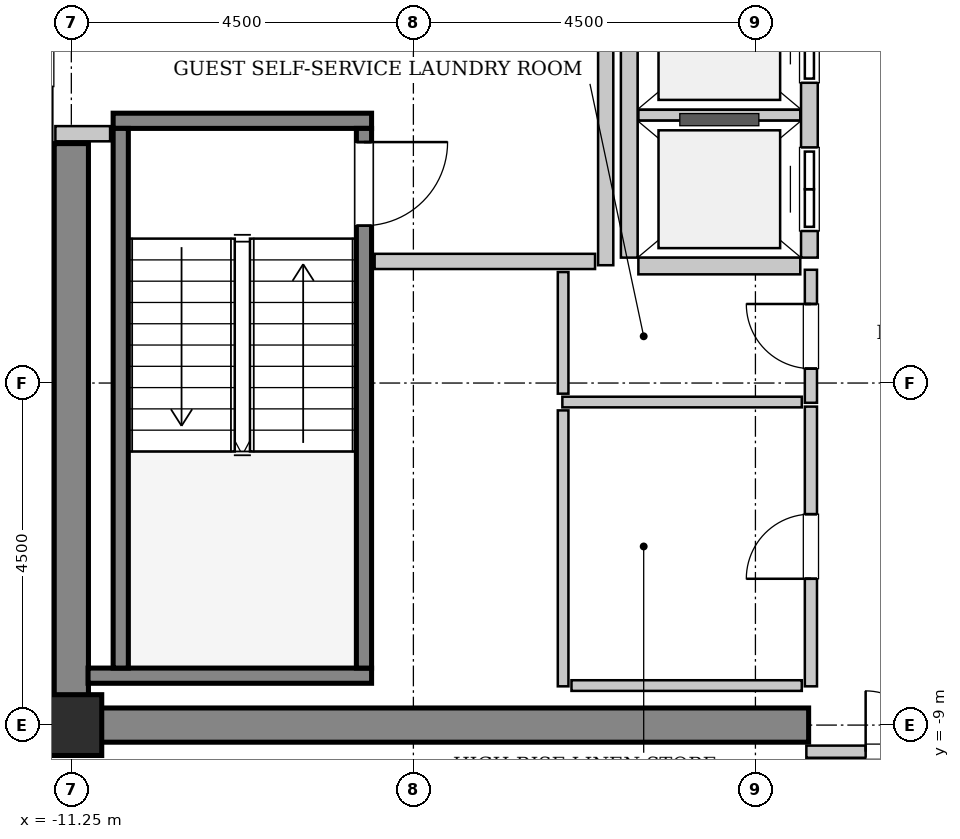
"""IFC4 building model, lengths in metres.
Left out: names, types, materials, properties, quantities, classifications, styles, units other than length and angle.
Written with IfcOpenShell. Run it as: python <this file> out.ifc"""

import sys

from ifc_helpers import new_model, si_unit, direction, frame, frame_2d, origin, origin_2d, place, context, subcontext, project, spatial, rectangle, hollow_rectangle, extrude, source, transform, mapped, element, fill, save


model = new_model("IFC4")
c1 = context("Model", 3, precision=1e-05, world=origin(), true_north=direction((0.0, 1.0)))
c2 = subcontext(c1, "Body", "Model", "MODEL_VIEW")
j1 = project(units=[si_unit("LENGTHUNIT", "METRE"), si_unit("PLANEANGLEUNIT", "RADIAN")], contexts=[c1])
p1 = place(None, origin())
s1 = spatial("IfcSite", under=j1, at=p1, CompositionType="ELEMENT")
p2 = place(p1, origin())
s2 = spatial("IfcBuilding", under=s1, at=p2, CompositionType="ELEMENT")
p3 = place(p2, frame((0.0, 0.0, 268.4)))
s3 = spatial("IfcBuildingStorey", under=s2, at=p3, CompositionType="ELEMENT", Elevation=268.4)
m1 = source(origin(), c2, "Body", "SweptSolid", [
    extrude(rectangle(XDim=9.925, YDim=0.45, at=frame_2d((4.962, 0.0))), origin(), (0.0, 0.0, 1.0), 3.8),
])
p4 = place(p3, frame((-11.475, -9.0, 0.0), z_axis=(0.0, 0.0, 1.0), x_axis=(1.0, 0.0, 0.0)))
e1 = element("IfcWall", 1, at=p4, inside=s3, PredefinedType="SHEAR", context=c2, shape_type="MappedRepresentation", body=[
    mapped(m1, transform((0.0, 0.0, 0.0), x_axis=(1.0, 0.0, 0.0), y_axis=(0.0, 1.0, 0.0), z_axis=(0.0, 0.0, 1.0), scale=1.0)),
])
m2 = source(origin(), c2, "Body", "SweptSolid", [
    extrude(rectangle(XDim=7.425, YDim=0.45, at=frame_2d((3.712, 0.0))), origin(), (0.0, 0.0, 1.0), 3.8),
])
p5 = place(p3, frame((-11.25, -8.775, 0.0), z_axis=(0.0, 0.0, 1.0), x_axis=(0.0, 1.0, 0.0)))
e2 = element("IfcWall", 2, at=p5, inside=s3, PredefinedType="SHEAR", context=c2, shape_type="MappedRepresentation", body=[
    mapped(m2, transform((0.0, 0.0, 0.0), x_axis=(1.0, 0.0, 0.0), y_axis=(0.0, 1.0, 0.0), z_axis=(0.0, 0.0, 1.0), scale=1.0)),
])
m3 = source(origin(), c2, "Body", "SweptSolid", [
    extrude(hollow_rectangle(XDim=0.8, YDim=0.8, WallThickness=0.04, InnerFilletRadius=0.04, OuterFilletRadius=0.08, at=origin_2d()), origin(), (0.0, 0.0, 1.0), 3.8),
])
p6 = place(p3, frame((-11.25, -9.0, 0.0), z_axis=(0.0, 0.0, 1.0), x_axis=(1.0, 0.0, 0.0)))
e3 = element("IfcColumn", 3, at=p6, inside=s3, PredefinedType="COLUMN", context=c2, shape_type="MappedRepresentation", body=[
    mapped(m3, transform((0.0, 0.0, 0.0), x_axis=(1.0, 0.0, 0.0), y_axis=(0.0, 1.0, 0.0), z_axis=(0.0, 0.0, 1.0), scale=1.0)),
])
m4 = source(origin(), c2, "Body", "SweptSolid", [
    extrude(rectangle(XDim=3.4, YDim=0.2, at=frame_2d((1.7, 0.0))), origin(), (0.0, 0.0, 1.0), 3.8),
])
p7 = place(p3, frame((-10.7, -1.05, 0.0), z_axis=(0.0, 0.0, 1.0), x_axis=(1.0, 0.0, 0.0)))
e4 = element("IfcWall", 4, at=p7, inside=s3, PredefinedType="SOLIDWALL", context=c2, shape_type="MappedRepresentation", body=[
    mapped(m4, transform((0.0, 0.0, 0.0), x_axis=(1.0, 0.0, 0.0), y_axis=(0.0, 1.0, 0.0), z_axis=(0.0, 0.0, 1.0), scale=1.0)),
])
m5 = source(origin(), c2, "Body", "SweptSolid", [
    extrude(rectangle(XDim=3.73, YDim=0.2, at=frame_2d((1.865, 0.0))), origin(), (0.0, 0.0, 1.0), 3.8),
])
p8 = place(p3, frame((-11.03, -8.35, 0.0), z_axis=(0.0, 0.0, 1.0), x_axis=(1.0, 0.0, 0.0)))
e5 = element("IfcWall", 5, at=p8, inside=s3, PredefinedType="SOLIDWALL", context=c2, shape_type="MappedRepresentation", body=[
    mapped(m5, transform((0.0, 0.0, 0.0), x_axis=(1.0, 0.0, 0.0), y_axis=(0.0, 1.0, 0.0), z_axis=(0.0, 0.0, 1.0), scale=1.0)),
])
m6 = source(origin(), c2, "Body", "SweptSolid", [
    extrude(rectangle(XDim=7.1, YDim=0.2, at=frame_2d((3.55, 0.0))), origin(), (0.0, 0.0, 1.0), 3.8),
])
p9 = place(p3, frame((-10.6, -1.15, 0.0), z_axis=(0.0, 0.0, 1.0), x_axis=(0.0, -1.0, 0.0)))
e6 = element("IfcWall", 6, at=p9, inside=s3, PredefinedType="SOLIDWALL", context=c2, shape_type="MappedRepresentation", body=[
    mapped(m6, transform((0.0, 0.0, 0.0), x_axis=(1.0, 0.0, 0.0), y_axis=(0.0, 1.0, 0.0), z_axis=(0.0, 0.0, 1.0), scale=1.0)),
])
p10 = place(p3, frame((-7.4, -1.15, 0.0), z_axis=(0.0, 0.0, 1.0), x_axis=(0.0, -1.0, 0.0)))
e7 = element("IfcWall", 7, at=p10, inside=s3, PredefinedType="SOLIDWALL", context=c2, shape_type="MappedRepresentation", body=[
    mapped(m6, transform((0.0, 0.0, 0.0), x_axis=(1.0, 0.0, 0.0), y_axis=(0.0, 1.0, 0.0), z_axis=(0.0, 0.0, 1.0), scale=1.0)),
])
p11 = place(p10, frame((0.18, 0.0, 0.0)))
e8 = element("IfcOpeningElement", 8, at=p11, cuts=e7, PredefinedType="OPENING", context=c2, shape_type="SweptSolid", body=[
    extrude(rectangle(XDim=1.1, YDim=2.15, at=frame_2d((0.55, 1.075))), frame((0.0, 0.11, 0.0), z_axis=(0.0, -1.0, 0.0), x_axis=(1.0, 0.0, 0.0)), (0.0, 0.0, 1.0), 0.22),
])
m7 = source(origin(), c2, "Body", "SweptSolid", [
    extrude(rectangle(XDim=5.7, YDim=0.22, at=frame_2d((2.85, 0.0))), origin(), (0.0, 0.0, 1.0), 3.535),
])
p12 = place(p3, frame((-1.54, -2.85, 0.0), z_axis=(0.0, 0.0, 1.0), x_axis=(0.0, 1.0, 0.0)))
e9 = element("IfcWall", 9, at=p12, inside=s3, PredefinedType="SOLIDWALL", context=c2, shape_type="MappedRepresentation", body=[
    mapped(m7, transform((0.0, 0.0, 0.0), x_axis=(1.0, 0.0, 0.0), y_axis=(0.0, 1.0, 0.0), z_axis=(0.0, 0.0, 1.0), scale=1.0)),
])
p13 = place(p12, frame((0.35, 0.0, 0.0)))
e10 = element("IfcOpeningElement", 10, at=p13, cuts=e9, PredefinedType="OPENING", context=c2, shape_type="SweptSolid", body=[
    extrude(rectangle(XDim=1.1, YDim=2.2, at=frame_2d((0.55, 1.1))), frame((0.0, 0.12, 0.0), z_axis=(0.0, -1.0, 0.0), x_axis=(1.0, 0.0, 0.0)), (0.0, 0.0, 1.0), 0.24),
])
p14 = place(p12, frame((2.3, 0.0, 0.0)))
e11 = element("IfcOpeningElement", 11, at=p14, cuts=e9, PredefinedType="OPENING", context=c2, shape_type="SweptSolid", body=[
    extrude(rectangle(XDim=1.1, YDim=2.2, at=frame_2d((0.55, 1.1))), frame((0.0, 0.12, 0.0), z_axis=(0.0, -1.0, 0.0), x_axis=(1.0, 0.0, 0.0)), (0.0, 0.0, 1.0), 0.24),
])
p15 = place(p12, frame((4.25, 0.0, 0.0)))
e12 = element("IfcOpeningElement", 12, at=p15, cuts=e9, PredefinedType="OPENING", context=c2, shape_type="SweptSolid", body=[
    extrude(rectangle(XDim=1.1, YDim=2.2, at=frame_2d((0.55, 1.1))), frame((0.0, 0.12, 0.0), z_axis=(0.0, -1.0, 0.0), x_axis=(1.0, 0.0, 0.0)), (0.0, 0.0, 1.0), 0.24),
])
p16 = place(p3, frame((-3.91, 2.85, 0.0), z_axis=(0.0, 0.0, 1.0), x_axis=(0.0, -1.0, 0.0)))
e13 = element("IfcWall", 13, at=p16, inside=s3, PredefinedType="SOLIDWALL", context=c2, shape_type="MappedRepresentation", body=[
    mapped(m7, transform((0.0, 0.0, 0.0), x_axis=(1.0, 0.0, 0.0), y_axis=(0.0, 1.0, 0.0), z_axis=(0.0, 0.0, 1.0), scale=1.0)),
])
m8 = source(origin(), c2, "Body", "SweptSolid", [
    extrude(rectangle(XDim=2.13, YDim=0.22, at=frame_2d((1.065, 0.0))), origin(), (0.0, 0.0, 1.0), 3.535),
])
p17 = place(p3, frame((-3.79, -2.96, 0.0), z_axis=(0.0, 0.0, 1.0), x_axis=(1.0, 0.0, 0.0)))
e14 = element("IfcWall", 14, at=p17, inside=s3, PredefinedType="SOLIDWALL", context=c2, shape_type="MappedRepresentation", body=[
    mapped(m8, transform((0.0, 0.0, 0.0), x_axis=(1.0, 0.0, 0.0), y_axis=(0.0, 1.0, 0.0), z_axis=(0.0, 0.0, 1.0), scale=1.0)),
])
m9 = source(origin(), c2, "Body", "SweptSolid", [
    extrude(rectangle(XDim=2.13, YDim=0.14, at=frame_2d((1.065, 0.0))), origin(), (0.0, 0.0, 1.0), 3.535),
])
p18 = place(p3, frame((-3.79, -0.975, 0.0), z_axis=(0.0, 0.0, 1.0), x_axis=(1.0, 0.0, 0.0)))
e15 = element("IfcWall", 15, at=p18, inside=s3, PredefinedType="PARTITIONING", context=c2, shape_type="MappedRepresentation", body=[
    mapped(m9, transform((0.0, 0.0, 0.0), x_axis=(1.0, 0.0, 0.0), y_axis=(0.0, 1.0, 0.0), z_axis=(0.0, 0.0, 1.0), scale=1.0)),
])
m10 = source(origin(), c2, "Body", "SweptSolid", [
    extrude(rectangle(XDim=5.9, YDim=0.2, at=frame_2d((2.95, 0.0))), origin(), (0.0, 0.0, 1.0), 3.535),
])
p19 = place(p3, frame((-4.22, -2.95, 0.0), z_axis=(0.0, 0.0, 1.0), x_axis=(0.0, 1.0, 0.0)))
e16 = element("IfcWall", 16, at=p19, inside=s3, PredefinedType="PARTITIONING", context=c2, shape_type="MappedRepresentation", body=[
    mapped(m10, transform((0.0, 0.0, 0.0), x_axis=(1.0, 0.0, 0.0), y_axis=(0.0, 1.0, 0.0), z_axis=(0.0, 0.0, 1.0), scale=1.0)),
])
m11 = source(origin(), c2, "Body", "SweptSolid", [
    extrude(rectangle(XDim=2.9, YDim=0.2, at=frame_2d((1.45, 0.0))), origin(), (0.0, 0.0, 1.0), 3.535),
])
p20 = place(p3, frame((-7.26, -2.9, 0.0), z_axis=(0.0, 0.0, 1.0), x_axis=(1.0, 0.0, 0.0)))
e17 = element("IfcWall", 17, at=p20, inside=s3, PredefinedType="PARTITIONING", context=c2, shape_type="MappedRepresentation", body=[
    mapped(m11, transform((0.0, 0.0, 0.0), x_axis=(1.0, 0.0, 0.0), y_axis=(0.0, 1.0, 0.0), z_axis=(0.0, 0.0, 1.0), scale=1.0)),
])
m12 = source(origin(), c2, "Body", "SweptSolid", [
    extrude(rectangle(XDim=0.72, YDim=0.2, at=frame_2d((0.36, 0.0))), origin(), (0.0, 0.0, 1.0), 3.535),
])
p21 = place(p3, frame((-11.46, -1.22, 0.0), z_axis=(0.0, 0.0, 1.0), x_axis=(1.0, 0.0, 0.0)))
e18 = element("IfcWall", 18, at=p21, inside=s3, PredefinedType="PARTITIONING", context=c2, shape_type="MappedRepresentation", body=[
    mapped(m12, transform((0.0, 0.0, 0.0), x_axis=(1.0, 0.0, 0.0), y_axis=(0.0, 1.0, 0.0), z_axis=(0.0, 0.0, 1.0), scale=1.0)),
])
m13 = source(origin(), c2, "Body", "SweptSolid", [
    extrude(rectangle(XDim=3.16, YDim=0.16, at=frame_2d((1.58, 0.0))), origin(), (0.0, 0.0, 1.0), 2.625),
])
p22 = place(p3, frame((-1.58, -9.35, 0.0), z_axis=(0.0, 0.0, 1.0), x_axis=(1.0, 0.0, 0.0)))
e19 = element("IfcWall", 19, at=p22, inside=s3, PredefinedType="PARTITIONING", context=c2, shape_type="MappedRepresentation", body=[
    mapped(m13, transform((0.0, 0.0, 0.0), x_axis=(1.0, 0.0, 0.0), y_axis=(0.0, 1.0, 0.0), z_axis=(0.0, 0.0, 1.0), scale=1.0)),
])
p23 = place(p22, frame((0.78, 0.0, 0.0)))
e20 = element("IfcOpeningElement", 20, at=p23, cuts=e19, PredefinedType="OPENING", context=c2, shape_type="SweptSolid", body=[
    extrude(rectangle(XDim=1.6, YDim=2.3, at=frame_2d((0.8, 1.15))), frame((0.0, 0.09, 0.0), z_axis=(0.0, -1.0, 0.0), x_axis=(1.0, 0.0, 0.0)), (0.0, 0.0, 1.0), 0.18),
])
m14 = source(origin(), c2, "Body", "SweptSolid", [
    extrude(rectangle(XDim=1.75, YDim=0.16, at=frame_2d((0.875, 0.0))), origin(), (0.0, 0.0, 1.0), 3.535),
])
p24 = place(p3, frame((-1.52, -4.76, 0.0), z_axis=(0.0, 0.0, 1.0), x_axis=(0.0, 1.0, 0.0)))
e21 = element("IfcWall", 21, at=p24, inside=s3, PredefinedType="PARTITIONING", context=c2, shape_type="MappedRepresentation", body=[
    mapped(m14, transform((0.0, 0.0, 0.0), x_axis=(1.0, 0.0, 0.0), y_axis=(0.0, 1.0, 0.0), z_axis=(0.0, 0.0, 1.0), scale=1.0)),
])
p25 = place(p24, frame((0.45, 0.0, 0.0)))
e22 = element("IfcOpeningElement", 22, at=p25, cuts=e21, PredefinedType="OPENING", context=c2, shape_type="SweptSolid", body=[
    extrude(rectangle(XDim=0.85, YDim=2.1, at=frame_2d((0.425, 1.05))), frame((0.0, 0.09, 0.0), z_axis=(0.0, -1.0, 0.0), x_axis=(1.0, 0.0, 0.0)), (0.0, 0.0, 1.0), 0.18),
])
m15 = source(origin(), c2, "Body", "SweptSolid", [
    extrude(rectangle(XDim=3.15, YDim=0.14, at=frame_2d((1.575, 0.0))), origin(), (0.0, 0.0, 1.0), 3.535),
])
p26 = place(p3, frame((-4.79, -4.75, 0.0), z_axis=(0.0, 0.0, 1.0), x_axis=(1.0, 0.0, 0.0)))
e23 = element("IfcWall", 23, at=p26, inside=s3, PredefinedType="PARTITIONING", context=c2, shape_type="MappedRepresentation", body=[
    mapped(m15, transform((0.0, 0.0, 0.0), x_axis=(1.0, 0.0, 0.0), y_axis=(0.0, 1.0, 0.0), z_axis=(0.0, 0.0, 1.0), scale=1.0)),
])
m16 = source(origin(), c2, "Body", "SweptSolid", [
    extrude(rectangle(XDim=1.6, YDim=0.14, at=frame_2d((0.8, 0.0))), origin(), (0.0, 0.0, 1.0), 3.535),
])
p27 = place(p3, frame((-4.78, -4.64, 0.0), z_axis=(0.0, 0.0, 1.0), x_axis=(0.0, 1.0, 0.0)))
e24 = element("IfcWall", 24, at=p27, inside=s3, PredefinedType="PARTITIONING", context=c2, shape_type="MappedRepresentation", body=[
    mapped(m16, transform((0.0, 0.0, 0.0), x_axis=(1.0, 0.0, 0.0), y_axis=(0.0, 1.0, 0.0), z_axis=(0.0, 0.0, 1.0), scale=1.0)),
])
m17 = source(origin(), c2, "Body", "SweptSolid", [
    extrude(rectangle(XDim=3.68, YDim=0.16, at=frame_2d((1.84, 0.0))), origin(), (0.0, 0.0, 1.0), 3.535),
])
p28 = place(p3, frame((-1.52, -8.49, 0.0), z_axis=(0.0, 0.0, 1.0), x_axis=(0.0, 1.0, 0.0)))
e25 = element("IfcWall", 25, at=p28, inside=s3, PredefinedType="PARTITIONING", context=c2, shape_type="MappedRepresentation", body=[
    mapped(m17, transform((0.0, 0.0, 0.0), x_axis=(1.0, 0.0, 0.0), y_axis=(0.0, 1.0, 0.0), z_axis=(0.0, 0.0, 1.0), scale=1.0)),
])
p29 = place(p28, frame((1.415, 0.0, 0.0)))
e26 = element("IfcOpeningElement", 26, at=p29, cuts=e25, PredefinedType="OPENING", context=c2, shape_type="SweptSolid", body=[
    extrude(rectangle(XDim=0.85, YDim=2.1, at=frame_2d((0.425, 1.05))), frame((0.0, 0.09, 0.0), z_axis=(0.0, -1.0, 0.0), x_axis=(1.0, 0.0, 0.0)), (0.0, 0.0, 1.0), 0.18),
])
m18 = source(origin(), c2, "Body", "SweptSolid", [
    extrude(rectangle(XDim=3.63, YDim=0.14, at=frame_2d((1.815, 0.0))), origin(), (0.0, 0.0, 1.0), 3.535),
])
p30 = place(p3, frame((-4.78, -8.49, 0.0), z_axis=(0.0, 0.0, 1.0), x_axis=(0.0, 1.0, 0.0)))
e27 = element("IfcWall", 27, at=p30, inside=s3, PredefinedType="PARTITIONING", context=c2, shape_type="MappedRepresentation", body=[
    mapped(m18, transform((0.0, 0.0, 0.0), x_axis=(1.0, 0.0, 0.0), y_axis=(0.0, 1.0, 0.0), z_axis=(0.0, 0.0, 1.0), scale=1.0)),
])
m19 = source(origin(), c2, "Body", "SweptSolid", [
    extrude(rectangle(XDim=3.03, YDim=0.14, at=frame_2d((1.515, 0.0))), origin(), (0.0, 0.0, 1.0), 3.535),
])
p31 = place(p3, frame((-4.67, -8.48, 0.0), z_axis=(0.0, 0.0, 1.0), x_axis=(1.0, 0.0, 0.0)))
e28 = element("IfcWall", 28, at=p31, inside=s3, PredefinedType="PARTITIONING", context=c2, shape_type="MappedRepresentation", body=[
    mapped(m19, transform((0.0, 0.0, 0.0), x_axis=(1.0, 0.0, 0.0), y_axis=(0.0, 1.0, 0.0), z_axis=(0.0, 0.0, 1.0), scale=1.0)),
])
m20 = source(origin(), c2, "Body", "SweptSolid", [
    extrude(rectangle(XDim=1.1, YDim=2.15, at=frame_2d((0.55, 1.075))), frame((0.0, 0.025, 0.0), z_axis=(0.0, -1.0, 0.0), x_axis=(1.0, 0.0, 0.0)), (0.0, 0.0, 1.0), 0.05),
])
p32 = place(p11, origin())
e29 = element("IfcDoor", 29, at=p32, inside=s3, OperationType="SINGLE_SWING_LEFT", PredefinedType="DOOR", context=c2, shape_type="MappedRepresentation", body=[
    mapped(m20, transform((0.0, 0.0, 0.0), x_axis=(1.0, 0.0, 0.0), y_axis=(0.0, 1.0, 0.0), z_axis=(0.0, 0.0, 1.0), scale=1.0)),
])
fill(e8, e29)
m21 = source(origin(), c2, "Body", "SweptSolid", [
    extrude(rectangle(XDim=1.1, YDim=2.2, at=frame_2d((0.55, 1.1))), frame((0.0, 0.025, 0.0), z_axis=(0.0, -1.0, 0.0), x_axis=(1.0, 0.0, 0.0)), (0.0, 0.0, 1.0), 0.05),
])
p33 = place(p13, origin())
e30 = element("IfcDoor", 30, at=p33, inside=s3, OperationType="DOUBLE_DOOR_SLIDING", PredefinedType="DOOR", context=c2, shape_type="MappedRepresentation", body=[
    mapped(m21, transform((0.0, 0.0, 0.0), x_axis=(1.0, 0.0, 0.0), y_axis=(0.0, 1.0, 0.0), z_axis=(0.0, 0.0, 1.0), scale=1.0)),
])
fill(e10, e30)
p34 = place(p14, origin())
e31 = element("IfcDoor", 31, at=p34, inside=s3, OperationType="DOUBLE_DOOR_SLIDING", PredefinedType="DOOR", context=c2, shape_type="MappedRepresentation", body=[
    mapped(m21, transform((0.0, 0.0, 0.0), x_axis=(1.0, 0.0, 0.0), y_axis=(0.0, 1.0, 0.0), z_axis=(0.0, 0.0, 1.0), scale=1.0)),
])
fill(e11, e31)
m22 = source(origin(), c2, "Body", "SweptSolid", [
    extrude(rectangle(XDim=1.6, YDim=2.3, at=frame_2d((0.8, 1.15))), frame((0.0, 0.025, 0.0), z_axis=(0.0, -1.0, 0.0), x_axis=(1.0, 0.0, 0.0)), (0.0, 0.0, 1.0), 0.05),
])
p35 = place(p23, origin())
e32 = element("IfcDoor", 32, at=p35, inside=s3, OperationType="DOUBLE_DOOR_SINGLE_SWING", PredefinedType="DOOR", context=c2, shape_type="MappedRepresentation", body=[
    mapped(m22, transform((0.0, 0.0, 0.0), x_axis=(1.0, 0.0, 0.0), y_axis=(0.0, 1.0, 0.0), z_axis=(0.0, 0.0, 1.0), scale=1.0)),
])
fill(e20, e32)
m23 = source(origin(), c2, "Body", "SweptSolid", [
    extrude(rectangle(XDim=0.85, YDim=2.1, at=frame_2d((0.425, 1.05))), frame((0.0, 0.025, 0.0), z_axis=(0.0, -1.0, 0.0), x_axis=(1.0, 0.0, 0.0)), (0.0, 0.0, 1.0), 0.05),
])
p36 = place(p25, origin())
e33 = element("IfcDoor", 33, at=p36, inside=s3, OperationType="SINGLE_SWING_RIGHT", PredefinedType="DOOR", context=c2, shape_type="MappedRepresentation", body=[
    mapped(m23, transform((0.0, 0.0, 0.0), x_axis=(1.0, 0.0, 0.0), y_axis=(0.0, 1.0, 0.0), z_axis=(0.0, 0.0, 1.0), scale=1.0)),
])
fill(e22, e33)
p37 = place(p29, origin())
e34 = element("IfcDoor", 34, at=p37, inside=s3, OperationType="SINGLE_SWING_LEFT", PredefinedType="DOOR", context=c2, shape_type="MappedRepresentation", body=[
    mapped(m23, transform((0.0, 0.0, 0.0), x_axis=(1.0, 0.0, 0.0), y_axis=(0.0, 1.0, 0.0), z_axis=(0.0, 0.0, 1.0), scale=1.0)),
])
fill(e26, e34)
save(model, sys.argv[1])
